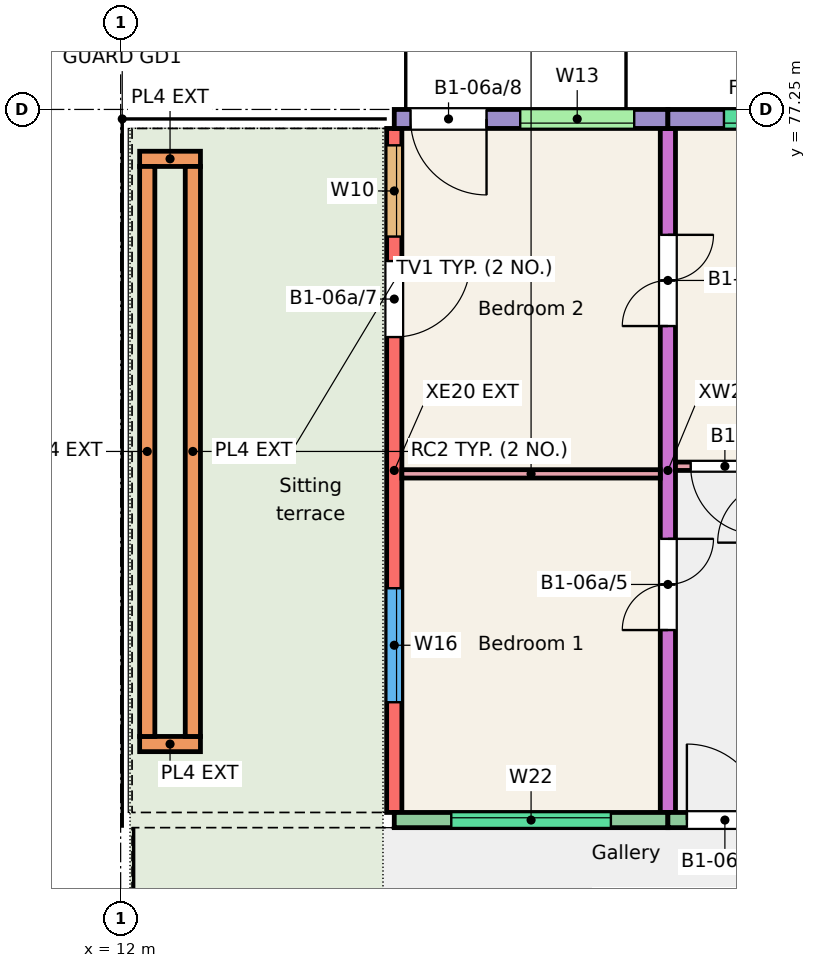
"""IFC4 building model, lengths in metres.
Left out: names, types, materials, properties, quantities, classifications, styles, units other than length and angle.
Written with IfcOpenShell. Run it as: python <this file> out.ifc"""

import sys

from ifc_helpers import new_model, si_unit, direction, frame, frame_2d, origin, place, context, subcontext, project, spatial, rectangle, extrude, element, fill, save


model = new_model("IFC4")
c1 = context("Model", 3, precision=1e-05, world=origin(), true_north=direction((0.0, 1.0)))
c2 = subcontext(c1, "Body", "Model", "MODEL_VIEW")
j1 = project(units=[si_unit("LENGTHUNIT", "METRE"), si_unit("PLANEANGLEUNIT", "RADIAN")], contexts=[c1])
p1 = place(None, origin())
s1 = spatial("IfcSite", under=j1, at=p1, CompositionType="ELEMENT")
p2 = place(p1, origin())
s2 = spatial("IfcBuilding", under=s1, at=p2, CompositionType="ELEMENT")
p3 = place(p2, frame((0.0, 0.0, 18.0)))
s3 = spatial("IfcBuildingStorey", under=s2, at=p3, CompositionType="ELEMENT", Elevation=18.0)
p4 = place(p3, frame((15.6, 68.0, 0.0), z_axis=(0.0, 0.0, 1.0), x_axis=(0.0, 1.0, 0.0)))
e1 = element("IfcWall", 1, at=p4, inside=s3, PredefinedType="SHEAR", context=c2, shape_type="SweptSolid", body=[
    extrude(rectangle(XDim=9.0, YDim=0.2, at=frame_2d((4.5, 0.0))), origin(), (0.0, 0.0, 1.0), 3.0),
])
p5 = place(p4, frame((1.45, 0.0, 0.9)))
e2 = element("IfcOpeningElement", 2, at=p5, cuts=e1, PredefinedType="OPENING", context=c2, shape_type="SweptSolid", body=[
    extrude(rectangle(XDim=1.5, YDim=1.5, at=frame_2d((0.75, 0.75))), frame((0.0, 0.11, 0.0), z_axis=(0.0, -1.0, 0.0), x_axis=(1.0, 0.0, 0.0)), (0.0, 0.0, 1.0), 0.22),
])
p6 = place(p4, frame((7.577, 0.0, 0.9)))
e3 = element("IfcOpeningElement", 3, at=p6, cuts=e1, PredefinedType="OPENING", context=c2, shape_type="SweptSolid", body=[
    extrude(rectangle(XDim=1.2, YDim=1.5, at=frame_2d((0.6, 0.75))), frame((0.0, 0.11, 0.0), z_axis=(0.0, -1.0, 0.0), x_axis=(1.0, 0.0, 0.0)), (0.0, 0.0, 1.0), 0.22),
])
p7 = place(p4, frame((6.255, 0.0, 0.0)))
e4 = element("IfcOpeningElement", 4, at=p7, cuts=e1, PredefinedType="OPENING", context=c2, shape_type="SweptSolid", body=[
    extrude(rectangle(XDim=1.0, YDim=2.1, at=frame_2d((0.5, 1.05))), frame((0.0, 0.11, 0.0), z_axis=(0.0, -1.0, 0.0), x_axis=(1.0, 0.0, 0.0)), (0.0, 0.0, 1.0), 0.22),
])
p8 = place(p3, frame((19.2, 68.0, 0.0), z_axis=(0.0, 0.0, 1.0), x_axis=(0.0, 1.0, 0.0)))
e5 = element("IfcWall", 5, at=p8, inside=s3, PredefinedType="SHEAR", context=c2, shape_type="SweptSolid", body=[
    extrude(rectangle(XDim=9.0, YDim=0.2, at=frame_2d((4.5, 0.0))), origin(), (0.0, 0.0, 1.0), 3.0),
])
p9 = place(p8, frame((2.4, 0.0, 0.0)))
e6 = element("IfcOpeningElement", 6, at=p9, cuts=e5, PredefinedType="OPENING", context=c2, shape_type="SweptSolid", body=[
    extrude(rectangle(XDim=1.2, YDim=2.1, at=frame_2d((0.6, 1.05))), frame((0.0, 0.11, 0.0), z_axis=(0.0, -1.0, 0.0), x_axis=(1.0, 0.0, 0.0)), (0.0, 0.0, 1.0), 0.22),
])
p10 = place(p8, frame((6.4, 0.0, 0.0)))
e7 = element("IfcOpeningElement", 7, at=p10, cuts=e5, PredefinedType="OPENING", context=c2, shape_type="SweptSolid", body=[
    extrude(rectangle(XDim=1.2, YDim=2.1, at=frame_2d((0.6, 1.05))), frame((0.0, 0.11, 0.0), z_axis=(0.0, -1.0, 0.0), x_axis=(1.0, 0.0, 0.0)), (0.0, 0.0, 1.0), 0.22),
])
p11 = place(p3, frame((15.6, 77.125, 0.0), z_axis=(0.0, 0.0, 1.0), x_axis=(1.0, 0.0, 0.0)))
e8 = element("IfcWall", 8, at=p11, inside=s3, PredefinedType="SOLIDWALL", context=c2, shape_type="SweptSolid", body=[
    extrude(rectangle(XDim=3.6, YDim=0.25, at=frame_2d((1.8, 0.0))), origin(), (0.0, 0.0, 1.0), 3.0),
])
p12 = place(p11, frame((1.657, 0.0, 1.2)))
e9 = element("IfcOpeningElement", 9, at=p12, cuts=e8, PredefinedType="OPENING", context=c2, shape_type="SweptSolid", body=[
    extrude(rectangle(XDim=1.5, YDim=1.2, at=frame_2d((0.75, 0.6))), frame((0.0, 0.135, 0.0), z_axis=(0.0, -1.0, 0.0), x_axis=(1.0, 0.0, 0.0)), (0.0, 0.0, 1.0), 0.27),
])
p13 = place(p11, frame((0.214, 0.0, 0.0)))
e10 = element("IfcOpeningElement", 10, at=p13, cuts=e8, PredefinedType="OPENING", context=c2, shape_type="SweptSolid", body=[
    extrude(rectangle(XDim=1.0, YDim=2.1, at=frame_2d((0.5, 1.05))), frame((0.0, 0.135, 0.0), z_axis=(0.0, -1.0, 0.0), x_axis=(1.0, 0.0, 0.0)), (0.0, 0.0, 1.0), 0.27),
])
p14 = place(p3, frame((15.6, 67.9, 0.0), z_axis=(0.0, 0.0, 1.0), x_axis=(1.0, 0.0, 0.0)))
e11 = element("IfcWall", 11, at=p14, inside=s3, PredefinedType="SOLIDWALL", context=c2, shape_type="SweptSolid", body=[
    extrude(rectangle(XDim=3.6, YDim=0.2, at=frame_2d((1.8, 0.0))), origin(), (0.0, 0.0, 1.0), 3.0),
])
p15 = place(p14, frame((0.75, 0.0, 1.2)))
e12 = element("IfcOpeningElement", 12, at=p15, cuts=e11, PredefinedType="OPENING", context=c2, shape_type="SweptSolid", body=[
    extrude(rectangle(XDim=2.1, YDim=1.2, at=frame_2d((1.05, 0.6))), frame((0.0, 0.11, 0.0), z_axis=(0.0, -1.0, 0.0), x_axis=(1.0, 0.0, 0.0)), (0.0, 0.0, 1.0), 0.22),
])
p16 = place(p3, frame((19.2, 77.125, 0.0), z_axis=(0.0, 0.0, 1.0), x_axis=(1.0, 0.0, 0.0)))
e13 = element("IfcWall", 13, at=p16, inside=s3, PredefinedType="SOLIDWALL", context=c2, shape_type="SweptSolid", body=[
    extrude(rectangle(XDim=3.6, YDim=0.25, at=frame_2d((1.8, 0.0))), origin(), (0.0, 0.0, 1.0), 3.0),
])
p17 = place(p16, frame((0.738, 0.0, 1.2)))
e14 = element("IfcOpeningElement", 14, at=p17, cuts=e13, PredefinedType="OPENING", context=c2, shape_type="SweptSolid", body=[
    extrude(rectangle(XDim=2.1, YDim=1.2, at=frame_2d((1.05, 0.6))), frame((0.0, 0.135, 0.0), z_axis=(0.0, -1.0, 0.0), x_axis=(1.0, 0.0, 0.0)), (0.0, 0.0, 1.0), 0.27),
])
p18 = place(p3, frame((19.2, 67.9, 0.0), z_axis=(0.0, 0.0, 1.0), x_axis=(1.0, 0.0, 0.0)))
e15 = element("IfcWall", 15, at=p18, inside=s3, PredefinedType="SOLIDWALL", context=c2, shape_type="SweptSolid", body=[
    extrude(rectangle(XDim=3.6, YDim=0.2, at=frame_2d((1.8, 0.0))), origin(), (0.0, 0.0, 1.0), 3.0),
])
p19 = place(p18, frame((1.893, 0.0, 1.1)))
e16 = element("IfcOpeningElement", 16, at=p19, cuts=e15, PredefinedType="OPENING", context=c2, shape_type="SweptSolid", body=[
    extrude(rectangle(XDim=1.2, YDim=1.3, at=frame_2d((0.6, 0.65))), frame((0.0, 0.11, 0.0), z_axis=(0.0, -1.0, 0.0), x_axis=(1.0, 0.0, 0.0)), (0.0, 0.0, 1.0), 0.22),
])
p20 = place(p18, frame((0.25, 0.0, 0.0)))
e17 = element("IfcOpeningElement", 17, at=p20, cuts=e15, PredefinedType="OPENING", context=c2, shape_type="SweptSolid", body=[
    extrude(rectangle(XDim=1.0, YDim=2.1, at=frame_2d((0.5, 1.05))), frame((0.0, 0.11, 0.0), z_axis=(0.0, -1.0, 0.0), x_axis=(1.0, 0.0, 0.0)), (0.0, 0.0, 1.0), 0.22),
])
for number, where, z_axis, x_axis in (
    (18, (12.25, 68.9, 0.01), (0.0, 0.0, 1.0), (1.0, 0.0, 0.0)),
    (19, (12.25, 76.6, 0.01), (0.0, 0.0, 1.0), (1.0, 0.0, 0.0)),
):
    element("IfcWall", number, at=place(p3, frame(where, z_axis=z_axis, x_axis=x_axis)), inside=s3, PredefinedType="SOLIDWALL", context=c2, shape_type="SweptSolid", body=[
        extrude(rectangle(XDim=0.8, YDim=0.2, at=frame_2d((0.4, 0.0))), origin(), (0.0, 0.0, 1.0), 0.45),
    ])
for number, where, z_axis, x_axis in (
    (20, (12.35, 69.0, 0.01), (0.0, 0.0, 1.0), (0.0, 1.0, 0.0)),
    (21, (12.95, 69.0, 0.01), (0.0, 0.0, 1.0), (0.0, 1.0, 0.0)),
):
    element("IfcWall", number, at=place(p3, frame(where, z_axis=z_axis, x_axis=x_axis)), inside=s3, PredefinedType="SOLIDWALL", context=c2, shape_type="SweptSolid", body=[
        extrude(rectangle(XDim=7.5, YDim=0.2, at=frame_2d((3.75, 0.0))), origin(), (0.0, 0.0, 1.0), 0.45),
    ])
p21 = place(p3, frame((19.3, 72.555, 0.0), z_axis=(0.0, 0.0, 1.0), x_axis=(1.0, 0.0, 0.0)))
e22 = element("IfcWall", 22, at=p21, inside=s3, PredefinedType="PARTITIONING", context=c2, shape_type="SweptSolid", body=[
    extrude(rectangle(XDim=3.375, YDim=0.11, at=frame_2d((1.688, 0.0))), origin(), (0.0, 0.0, 1.0), 2.8),
])
p22 = place(p21, frame((0.2, 0.0, 0.0)))
e23 = element("IfcOpeningElement", 23, at=p22, cuts=e22, PredefinedType="OPENING", context=c2, shape_type="SweptSolid", body=[
    extrude(rectangle(XDim=0.9, YDim=2.1, at=frame_2d((0.45, 1.05))), frame((0.0, 0.065, 0.0), z_axis=(0.0, -1.0, 0.0), x_axis=(1.0, 0.0, 0.0)), (0.0, 0.0, 1.0), 0.13),
])
p23 = place(p3, frame((15.7, 72.455, 0.0), z_axis=(0.0, 0.0, 1.0), x_axis=(1.0, 0.0, 0.0)))
e24 = element("IfcWall", 24, at=p23, inside=s3, PredefinedType="PARTITIONING", context=c2, shape_type="SweptSolid", body=[
    extrude(rectangle(XDim=3.4, YDim=0.11, at=frame_2d((1.7, 0.0))), origin(), (0.0, 0.0, 1.0), 2.75),
])
p24 = place(p15, origin())
e25 = element("IfcWindow", 25, at=p24, inside=s3, PartitioningType="SINGLE_PANEL", PredefinedType="WINDOW", context=c2, shape_type="SweptSolid", body=[
    extrude(rectangle(XDim=2.1, YDim=1.2, at=frame_2d((1.05, 0.6))), frame((0.0, 0.06, 0.0), z_axis=(0.0, -1.0, 0.0), x_axis=(1.0, 0.0, 0.0)), (0.0, 0.0, 1.0), 0.06),
])
fill(e12, e25)
p25 = place(p12, origin())
e26 = element("IfcWindow", 26, at=p25, inside=s3, PartitioningType="SINGLE_PANEL", PredefinedType="WINDOW", context=c2, shape_type="SweptSolid", body=[
    extrude(rectangle(XDim=1.5, YDim=1.2, at=frame_2d((0.75, 0.6))), frame((0.0, -0.025, 0.0), z_axis=(0.0, -1.0, 0.0), x_axis=(1.0, 0.0, 0.0)), (0.0, 0.0, 1.0), 0.06),
])
fill(e9, e26)
p26 = place(p17, origin())
e27 = element("IfcWindow", 27, at=p26, inside=s3, PartitioningType="SINGLE_PANEL", PredefinedType="WINDOW", context=c2, shape_type="SweptSolid", body=[
    extrude(rectangle(XDim=2.1, YDim=1.2, at=frame_2d((1.05, 0.6))), frame((0.0, -0.025, 0.0), z_axis=(0.0, -1.0, 0.0), x_axis=(1.0, 0.0, 0.0)), (0.0, 0.0, 1.0), 0.06),
])
fill(e14, e27)
p27 = place(p5, origin())
e28 = element("IfcWindow", 28, at=p27, inside=s3, PartitioningType="SINGLE_PANEL", PredefinedType="WINDOW", context=c2, shape_type="SweptSolid", body=[
    extrude(rectangle(XDim=1.5, YDim=1.5, at=frame_2d((0.75, 0.75))), frame((0.0, 0.0, 0.0), z_axis=(0.0, -1.0, 0.0), x_axis=(1.0, 0.0, 0.0)), (0.0, 0.0, 1.0), 0.06),
])
fill(e2, e28)
p28 = place(p6, origin())
e29 = element("IfcWindow", 29, at=p28, inside=s3, PartitioningType="SINGLE_PANEL", PredefinedType="WINDOW", context=c2, shape_type="SweptSolid", body=[
    extrude(rectangle(XDim=1.2, YDim=1.5, at=frame_2d((0.6, 0.75))), frame((0.0, 0.0, 0.0), z_axis=(0.0, -1.0, 0.0), x_axis=(1.0, 0.0, 0.0)), (0.0, 0.0, 1.0), 0.06),
])
fill(e3, e29)
p29 = place(p20, origin())
e30 = element("IfcDoor", 30, at=p29, inside=s3, OperationType="SINGLE_SWING_LEFT", PredefinedType="DOOR", context=c2, shape_type="SweptSolid", body=[
    extrude(rectangle(XDim=1.0, YDim=2.1, at=frame_2d((0.5, 1.05))), frame((0.0, 0.025, 0.0), z_axis=(0.0, -1.0, 0.0), x_axis=(1.0, 0.0, 0.0)), (0.0, 0.0, 1.0), 0.05),
])
fill(e17, e30)
p30 = place(p22, origin())
e31 = element("IfcDoor", 31, at=p30, inside=s3, OperationType="SINGLE_SWING_RIGHT", PredefinedType="DOOR", context=c2, shape_type="SweptSolid", body=[
    extrude(rectangle(XDim=0.9, YDim=2.1, at=frame_2d((0.45, 1.05))), frame((0.0, 0.025, 0.0), z_axis=(0.0, -1.0, 0.0), x_axis=(1.0, 0.0, 0.0)), (0.0, 0.0, 1.0), 0.05),
])
fill(e23, e31)
p31 = place(p9, origin())
e32 = element("IfcDoor", 32, at=p31, inside=s3, OperationType="DOUBLE_DOOR_SINGLE_SWING", PredefinedType="DOOR", context=c2, shape_type="SweptSolid", body=[
    extrude(rectangle(XDim=1.2, YDim=2.1, at=frame_2d((0.6, 1.05))), frame((0.0, 0.025, 0.0), z_axis=(0.0, -1.0, 0.0), x_axis=(1.0, 0.0, 0.0)), (0.0, 0.0, 1.0), 0.05),
])
fill(e6, e32)
p32 = place(p10, origin())
e33 = element("IfcDoor", 33, at=p32, inside=s3, OperationType="DOUBLE_DOOR_SINGLE_SWING", PredefinedType="DOOR", context=c2, shape_type="SweptSolid", body=[
    extrude(rectangle(XDim=1.2, YDim=2.1, at=frame_2d((0.6, 1.05))), frame((0.0, 0.025, 0.0), z_axis=(0.0, -1.0, 0.0), x_axis=(1.0, 0.0, 0.0)), (0.0, 0.0, 1.0), 0.05),
])
fill(e7, e33)
p33 = place(p7, origin())
e34 = element("IfcDoor", 34, at=p33, inside=s3, OperationType="SINGLE_SWING_RIGHT", PredefinedType="DOOR", context=c2, shape_type="SweptSolid", body=[
    extrude(rectangle(XDim=1.0, YDim=2.1, at=frame_2d((0.5, 1.05))), frame((0.0, 0.025, 0.0), z_axis=(0.0, -1.0, 0.0), x_axis=(1.0, 0.0, 0.0)), (0.0, 0.0, 1.0), 0.05),
])
fill(e4, e34)
p34 = place(p13, origin())
e35 = element("IfcDoor", 35, at=p34, inside=s3, OperationType="SINGLE_SWING_RIGHT", PredefinedType="DOOR", context=c2, shape_type="SweptSolid", body=[
    extrude(rectangle(XDim=1.0, YDim=2.1, at=frame_2d((0.5, 1.05))), frame((0.0, 0.025, 0.0), z_axis=(0.0, -1.0, 0.0), x_axis=(1.0, 0.0, 0.0)), (0.0, 0.0, 1.0), 0.05),
])
fill(e10, e35)
save(model, sys.argv[1])
